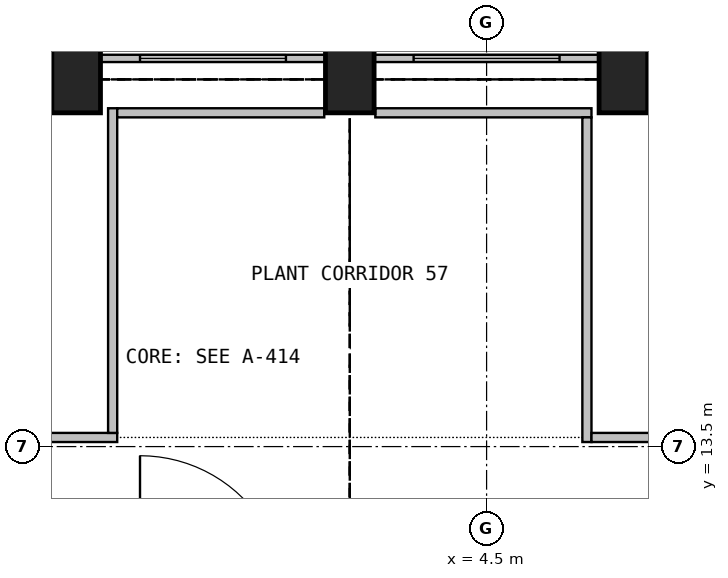
"""IFC4 building model, lengths in metres.
Left out: names, types, materials, properties, quantities, classifications, styles, units other than length and angle.
Written with IfcOpenShell. Run it as: python <this file> out.ifc"""

import sys

from ifc_helpers import new_model, si_unit, direction, frame, frame_2d, origin, origin_2d, place, context, subcontext, project, spatial, rectangle, extrude, element, fill, save


model = new_model("IFC4")
c1 = context("Model", 3, precision=1e-05, world=origin(), true_north=direction((0.0, 1.0)))
c2 = subcontext(c1, "Body", "Model", "MODEL_VIEW")
j1 = project(units=[si_unit("LENGTHUNIT", "METRE"), si_unit("PLANEANGLEUNIT", "RADIAN")], contexts=[c1])
p1 = place(None, origin())
s1 = spatial("IfcSite", under=j1, at=p1, CompositionType="ELEMENT")
p2 = place(p1, origin())
s2 = spatial("IfcBuilding", under=s1, at=p2, CompositionType="ELEMENT")
p3 = place(p2, frame((0.0, 0.0, 230.7)))
s3 = spatial("IfcBuildingStorey", under=s2, at=p3, CompositionType="ELEMENT", Elevation=230.7)
for number, where, z_axis, x_axis in (
    (1, (6.75, 19.539, 0.0), (0.0, 0.0, 1.0), (-1.0, 0.0, 0.0)),
    (2, (2.25, 19.539, 0.0), (0.0, 0.0, 1.0), (-1.0, 0.0, 0.0)),
    (3, (-2.25, 19.539, 0.0), (0.0, 0.0, 1.0), (-1.0, 0.0, 0.0)),
):
    element("IfcColumn", number, at=place(p3, frame(where, z_axis=z_axis, x_axis=x_axis)), inside=s3, PredefinedType="COLUMN", context=c2, shape_type="SweptSolid", body=[
        extrude(rectangle(XDim=0.8, YDim=1.1, at=origin_2d()), origin(), (0.0, 0.0, 1.0), 4.175),
    ])
p4 = place(p3, frame((6.35, 19.884, 0.0), z_axis=(0.0, 0.0, 1.0), x_axis=(-1.0, 0.0, 0.0)))
e4 = element("IfcWall", 4, at=p4, inside=s3, PredefinedType="SOLIDWALL", context=c2, shape_type="SweptSolid", body=[
    extrude(rectangle(XDim=3.699, YDim=0.12, at=frame_2d((1.85, 0.0))), origin(), (0.0, 0.0, 1.0), 4.175),
])
p5 = place(p4, frame((0.649, 0.0, 0.6)))
e5 = element("IfcOpeningElement", 5, at=p5, cuts=e4, PredefinedType="OPENING", context=c2, shape_type="SweptSolid", body=[
    extrude(rectangle(XDim=2.4, YDim=3.0, at=frame_2d((1.2, 1.5))), frame((0.0, 0.07, 0.0), z_axis=(0.0, -1.0, 0.0), x_axis=(1.0, 0.0, 0.0)), (0.0, 0.0, 1.0), 0.14),
])
p6 = place(p3, frame((1.85, 19.884, 0.0), z_axis=(0.0, 0.0, 1.0), x_axis=(-1.0, 0.0, 0.0)))
e6 = element("IfcWall", 6, at=p6, inside=s3, PredefinedType="SOLIDWALL", context=c2, shape_type="SweptSolid", body=[
    extrude(rectangle(XDim=3.699, YDim=0.12, at=frame_2d((1.85, 0.0))), origin(), (0.0, 0.0, 1.0), 4.175),
])
p7 = place(p6, frame((0.649, 0.0, 0.6)))
e7 = element("IfcOpeningElement", 7, at=p7, cuts=e6, PredefinedType="OPENING", context=c2, shape_type="SweptSolid", body=[
    extrude(rectangle(XDim=2.4, YDim=3.0, at=frame_2d((1.2, 1.5))), frame((0.0, 0.07, 0.0), z_axis=(0.0, -1.0, 0.0), x_axis=(1.0, 0.0, 0.0)), (0.0, 0.0, 1.0), 0.14),
])
p8 = place(p3, frame((-1.575, 13.65, 0.0), z_axis=(0.0, 0.0, 1.0), x_axis=(-1.0, 0.0, 0.0)))
e8 = element("IfcWall", 8, at=p8, inside=s3, PredefinedType="PARTITIONING", context=c2, shape_type="SweptSolid", body=[
    extrude(rectangle(XDim=14.25, YDim=0.15, at=frame_2d((7.125, 0.0))), origin(), (0.0, 0.0, 1.0), 4.175),
])
p9 = place(p8, frame((6.625, 0.0, 0.0)))
e9 = element("IfcOpeningElement", 9, at=p9, cuts=e8, PredefinedType="OPENING", context=c2, shape_type="SweptSolid", body=[
    extrude(rectangle(XDim=1.0, YDim=2.1, at=frame_2d((0.5, 1.05))), frame((0.0, 0.085, 0.0), z_axis=(0.0, -1.0, 0.0), x_axis=(1.0, 0.0, 0.0)), (0.0, 0.0, 1.0), 0.17),
])
p10 = place(p3, frame((-1.65, 13.725, 0.0), z_axis=(0.0, 0.0, 1.0), x_axis=(0.0, 1.0, 0.0)))
e10 = element("IfcWall", 10, at=p10, inside=s3, PredefinedType="PARTITIONING", context=c2, shape_type="SweptSolid", body=[
    extrude(rectangle(XDim=5.339, YDim=0.15, at=frame_2d((2.669, 0.0))), origin(), (0.0, 0.0, 1.0), 4.175),
])
p11 = place(p3, frame((-1.575, 18.989, 0.0), z_axis=(0.0, 0.0, 1.0), x_axis=(1.0, 0.0, 0.0)))
e11 = element("IfcWall", 11, at=p11, inside=s3, PredefinedType="PARTITIONING", context=c2, shape_type="SweptSolid", body=[
    extrude(rectangle(XDim=3.405, YDim=0.15, at=frame_2d((1.703, 0.0))), origin(), (0.0, 0.0, 1.0), 4.175),
])
p12 = place(p3, frame((2.67, 18.989, 0.0), z_axis=(0.0, 0.0, 1.0), x_axis=(1.0, 0.0, 0.0)))
e12 = element("IfcWall", 12, at=p12, inside=s3, PredefinedType="PARTITIONING", context=c2, shape_type="SweptSolid", body=[
    extrude(rectangle(XDim=3.555, YDim=0.15, at=frame_2d((1.778, 0.0))), origin(), (0.0, 0.0, 1.0), 4.175),
])
p13 = place(p3, frame((6.15, 18.914, 0.0), z_axis=(0.0, 0.0, 1.0), x_axis=(0.0, -1.0, 0.0)))
e13 = element("IfcWall", 13, at=p13, inside=s3, PredefinedType="PARTITIONING", context=c2, shape_type="SweptSolid", body=[
    extrude(rectangle(XDim=5.339, YDim=0.15, at=frame_2d((2.669, 0.0))), origin(), (0.0, 0.0, 1.0), 4.175),
])
p14 = place(p3, frame((15.975, 13.65, 0.0), z_axis=(0.0, 0.0, 1.0), x_axis=(-1.0, 0.0, 0.0)))
e14 = element("IfcWall", 14, at=p14, inside=s3, PredefinedType="PARTITIONING", context=c2, shape_type="SweptSolid", body=[
    extrude(rectangle(XDim=9.75, YDim=0.15, at=frame_2d((4.875, 0.0))), origin(), (0.0, 0.0, 1.0), 4.175),
])
p15 = place(p5, origin())
e15 = element("IfcWindow", 15, at=p15, inside=s3, PartitioningType="SINGLE_PANEL", PredefinedType="WINDOW", context=c2, shape_type="SweptSolid", body=[
    extrude(rectangle(XDim=2.4, YDim=3.0, at=frame_2d((1.2, 1.5))), frame((0.0, 0.06, 0.0), z_axis=(0.0, -1.0, 0.0), x_axis=(1.0, 0.0, 0.0)), (0.0, 0.0, 1.0), 0.02),
])
fill(e5, e15)
p16 = place(p7, origin())
e16 = element("IfcWindow", 16, at=p16, inside=s3, PartitioningType="SINGLE_PANEL", PredefinedType="WINDOW", context=c2, shape_type="SweptSolid", body=[
    extrude(rectangle(XDim=2.4, YDim=3.0, at=frame_2d((1.2, 1.5))), frame((0.0, 0.06, 0.0), z_axis=(0.0, -1.0, 0.0), x_axis=(1.0, 0.0, 0.0)), (0.0, 0.0, 1.0), 0.02),
])
fill(e7, e16)
save(model, sys.argv[1])
